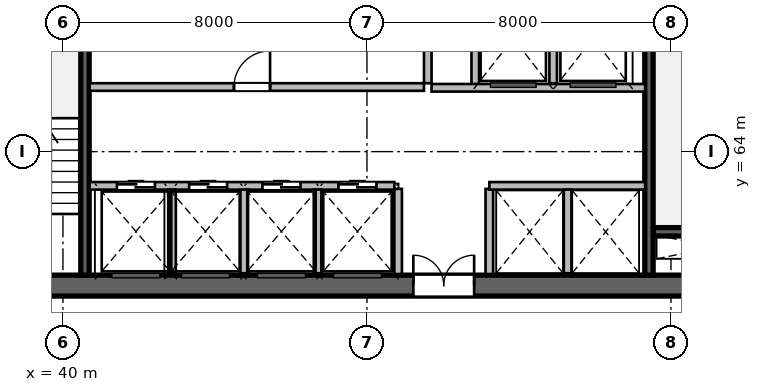
"""IFC4 building model, lengths in metres.
Left out: names, types, materials, properties, quantities, classifications, styles, units other than length and angle.
Written with IfcOpenShell. Run it as: python <this file> out.ifc"""

import sys

from ifc_helpers import new_model, si_unit, direction, frame, frame_2d, origin, place, context, subcontext, project, spatial, rectangle, extrude, source, transform, mapped, element, fill, save


model = new_model("IFC4")
c1 = context("Model", 3, precision=1e-05, world=origin(), true_north=direction((0.0, 1.0)))
c2 = subcontext(c1, "Body", "Model", "MODEL_VIEW")
j1 = project(units=[si_unit("LENGTHUNIT", "METRE"), si_unit("PLANEANGLEUNIT", "RADIAN")], contexts=[c1])
p1 = place(None, origin())
s1 = spatial("IfcSite", under=j1, at=p1, CompositionType="ELEMENT")
p2 = place(p1, origin())
s2 = spatial("IfcBuilding", under=s1, at=p2, CompositionType="ELEMENT")
p3 = place(p2, frame((0.0, 0.0, 82.2)))
s3 = spatial("IfcBuildingStorey", under=s2, at=p3, CompositionType="ELEMENT", Elevation=82.2)
m1 = source(origin(), c2, "Body", "SweptSolid", [
    extrude(rectangle(XDim=21.6, YDim=0.55, at=frame_2d((10.8, 0.0))), origin(), (0.0, 0.0, 1.0), 3.6),
])
p4 = place(p3, frame((37.2, 60.475, 0.0), z_axis=(0.0, 0.0, 1.0), x_axis=(1.0, 0.0, 0.0)))
e1 = element("IfcWall", 1, at=p4, inside=s3, PredefinedType="SHEAR", context=c2, shape_type="MappedRepresentation", body=[
    mapped(m1, transform((0.0, 0.0, 0.0), scale=1.0)),
])
p5 = place(p4, frame((1.1, 0.0, 0.0)))
e2 = element("IfcOpeningElement", 2, at=p5, cuts=e1, PredefinedType="OPENING", context=c2, shape_type="SweptSolid", body=[
    extrude(rectangle(XDim=1.15, YDim=2.15, at=frame_2d((0.575, 1.075))), frame((0.0, 0.285, 0.0), z_axis=(0.0, -1.0, 0.0), x_axis=(1.0, 0.0, 0.0)), (0.0, 0.0, 1.0), 0.57),
])
p6 = place(p4, frame((19.5, 0.0, 0.0)))
e3 = element("IfcOpeningElement", 3, at=p6, cuts=e1, PredefinedType="OPENING", context=c2, shape_type="SweptSolid", body=[
    extrude(rectangle(XDim=0.9, YDim=2.1, at=frame_2d((0.45, 1.05))), frame((0.0, 0.285, 0.0), z_axis=(0.0, -1.0, 0.0), x_axis=(1.0, 0.0, 0.0)), (0.0, 0.0, 1.0), 0.57),
])
p7 = place(p4, frame((12.02, 0.0, 0.0)))
e4 = element("IfcOpeningElement", 4, at=p7, cuts=e1, PredefinedType="OPENING", context=c2, shape_type="SweptSolid", body=[
    extrude(rectangle(XDim=1.6, YDim=2.15, at=frame_2d((0.8, 1.075))), frame((0.0, 0.285, 0.0), z_axis=(0.0, -1.0, 0.0), x_axis=(1.0, 0.0, 0.0)), (0.0, 0.0, 1.0), 0.57),
])
m2 = source(origin(), c2, "Body", "SweptSolid", [
    extrude(rectangle(XDim=3.27, YDim=0.22, at=frame_2d((1.635, 0.0))), origin(), (0.0, 0.0, 1.0), 3.6),
])
p8 = place(p3, frame((55.53, 61.89, 0.0), z_axis=(0.0, 0.0, 1.0), x_axis=(1.0, 0.0, 0.0)))
e5 = element("IfcWall", 5, at=p8, inside=s3, PredefinedType="SHEAR", context=c2, shape_type="MappedRepresentation", body=[
    mapped(m2, transform((0.0, 0.0, 0.0), scale=1.0)),
])
m3 = source(origin(), c2, "Body", "SweptSolid", [
    extrude(rectangle(XDim=10.9, YDim=0.22, at=frame_2d((5.45, 0.0))), origin(), (0.0, 0.0, 1.0), 3.6),
])
p9 = place(p3, frame((40.58, 60.75, 0.0), z_axis=(0.0, 0.0, 1.0), x_axis=(0.0, 1.0, 0.0)))
e6 = element("IfcWall", 6, at=p9, inside=s3, PredefinedType="SHEAR", context=c2, shape_type="MappedRepresentation", body=[
    mapped(m3, transform((0.0, 0.0, 0.0), scale=1.0)),
])
p10 = place(p3, frame((55.42, 60.75, 0.0), z_axis=(0.0, 0.0, 1.0), x_axis=(0.0, 1.0, 0.0)))
e7 = element("IfcWall", 7, at=p10, inside=s3, PredefinedType="SHEAR", context=c2, shape_type="MappedRepresentation", body=[
    mapped(m3, transform((0.0, 0.0, 0.0), scale=1.0)),
])
p11 = place(p10, frame((9.495, 0.0, 0.0)))
e8 = element("IfcOpeningElement", 8, at=p11, cuts=e7, PredefinedType="OPENING", context=c2, shape_type="SweptSolid", body=[
    extrude(rectangle(XDim=1.15, YDim=2.15, at=frame_2d((0.575, 1.075))), frame((0.0, 0.12, 0.0), z_axis=(0.0, -1.0, 0.0), x_axis=(1.0, 0.0, 0.0)), (0.0, 0.0, 1.0), 0.24),
])
m4 = source(origin(), c2, "Body", "SweptSolid", [
    extrude(rectangle(XDim=2.24, YDim=0.2, at=frame_2d((1.12, 0.0))), origin(), (0.0, 0.0, 1.0), 3.28),
])
for number, where, z_axis, x_axis in (
    (9, (48.82, 60.78, 0.0), (0.0, 0.0, 1.0), (0.0, 1.0, 0.0)),
    (10, (51.22, 60.78, 0.0), (0.0, 0.0, 1.0), (0.0, 1.0, 0.0)),
):
    element("IfcWall", number, at=place(p3, frame(where, z_axis=z_axis, x_axis=x_axis)), inside=s3, PredefinedType="SOLIDWALL", context=c2, shape_type="MappedRepresentation", body=[
        mapped(m4, transform((0.0, 0.0, 0.0), scale=1.0)),
    ])
m5 = source(origin(), c2, "Body", "SweptSolid", [
    extrude(rectangle(XDim=5.8, YDim=0.2, at=frame_2d((2.9, 0.0))), origin(), (0.0, 0.0, 1.0), 3.28),
])
p12 = place(p3, frame((49.6, 65.8, 0.0), z_axis=(0.0, 0.0, 1.0), x_axis=(0.0, 1.0, 0.0)))
e11 = element("IfcWall", 11, at=p12, inside=s3, PredefinedType="SOLIDWALL", context=c2, shape_type="MappedRepresentation", body=[
    mapped(m5, transform((0.0, 0.0, 0.0), scale=1.0)),
])
m6 = source(origin(), c2, "Body", "SweptSolid", [
    extrude(rectangle(XDim=2.58, YDim=0.2, at=frame_2d((1.29, 0.0))), origin(), (0.0, 0.0, 1.0), 3.28),
])
p13 = place(p3, frame((50.85, 65.68, 0.0), z_axis=(0.0, 0.0, 1.0), x_axis=(0.0, 1.0, 0.0)))
e12 = element("IfcWall", 12, at=p13, inside=s3, PredefinedType="SOLIDWALL", context=c2, shape_type="MappedRepresentation", body=[
    mapped(m6, transform((0.0, 0.0, 0.0), scale=1.0)),
])
m7 = source(origin(), c2, "Body", "SweptSolid", [
    extrude(rectangle(XDim=2.4, YDim=0.2, at=frame_2d((1.2, 0.0))), origin(), (0.0, 0.0, 1.0), 3.28),
])
p14 = place(p3, frame((52.9, 65.8, 0.0), z_axis=(0.0, 0.0, 1.0), x_axis=(0.0, 1.0, 0.0)))
e13 = element("IfcWall", 13, at=p14, inside=s3, PredefinedType="SOLIDWALL", context=c2, shape_type="MappedRepresentation", body=[
    mapped(m7, transform((0.0, 0.0, 0.0), scale=1.0)),
])
m8 = source(origin(), c2, "Body", "SweptSolid", [
    extrude(rectangle(XDim=5.62, YDim=0.2, at=frame_2d((2.81, 0.0))), origin(), (0.0, 0.0, 1.0), 3.28),
])
p15 = place(p3, frame((49.7, 65.68, 0.0), z_axis=(0.0, 0.0, 1.0), x_axis=(1.0, 0.0, 0.0)))
e14 = element("IfcWall", 14, at=p15, inside=s3, PredefinedType="SOLIDWALL", context=c2, shape_type="MappedRepresentation", body=[
    mapped(m8, transform((0.0, 0.0, 0.0), scale=1.0)),
])
m9 = source(origin(), c2, "Body", "SweptSolid", [
    extrude(rectangle(XDim=8.02, YDim=0.2, at=frame_2d((4.01, 0.0))), origin(), (0.0, 0.0, 1.0), 3.28),
])
p16 = place(p3, frame((40.7, 63.1, 0.0), z_axis=(0.0, 0.0, 1.0), x_axis=(1.0, 0.0, 0.0)))
e15 = element("IfcWall", 15, at=p16, inside=s3, PredefinedType="SOLIDWALL", context=c2, shape_type="MappedRepresentation", body=[
    mapped(m9, transform((0.0, 0.0, 0.0), scale=1.0)),
])
p17 = place(p16, frame((0.72, 0.0, 0.0)))
e16 = element("IfcOpeningElement", 16, at=p17, cuts=e15, PredefinedType="OPENING", context=c2, shape_type="SweptSolid", body=[
    extrude(rectangle(XDim=1.0, YDim=2.15, at=frame_2d((0.5, 1.075))), frame((0.0, 0.11, 0.0), z_axis=(0.0, -1.0, 0.0), x_axis=(1.0, 0.0, 0.0)), (0.0, 0.0, 1.0), 0.22),
])
p18 = place(p16, frame((2.62, 0.0, 0.0)))
e17 = element("IfcOpeningElement", 17, at=p18, cuts=e15, PredefinedType="OPENING", context=c2, shape_type="SweptSolid", body=[
    extrude(rectangle(XDim=1.0, YDim=2.15, at=frame_2d((0.5, 1.075))), frame((0.0, 0.11, 0.0), z_axis=(0.0, -1.0, 0.0), x_axis=(1.0, 0.0, 0.0)), (0.0, 0.0, 1.0), 0.22),
])
p19 = place(p16, frame((4.55, 0.0, 0.0)))
e18 = element("IfcOpeningElement", 18, at=p19, cuts=e15, PredefinedType="OPENING", context=c2, shape_type="SweptSolid", body=[
    extrude(rectangle(XDim=1.0, YDim=2.15, at=frame_2d((0.5, 1.075))), frame((0.0, 0.11, 0.0), z_axis=(0.0, -1.0, 0.0), x_axis=(1.0, 0.0, 0.0)), (0.0, 0.0, 1.0), 0.22),
])
p20 = place(p16, frame((6.55, 0.0, 0.0)))
e19 = element("IfcOpeningElement", 19, at=p20, cuts=e15, PredefinedType="OPENING", context=c2, shape_type="SweptSolid", body=[
    extrude(rectangle(XDim=1.0, YDim=2.15, at=frame_2d((0.5, 1.075))), frame((0.0, 0.11, 0.0), z_axis=(0.0, -1.0, 0.0), x_axis=(1.0, 0.0, 0.0)), (0.0, 0.0, 1.0), 0.22),
])
m10 = source(origin(), c2, "Body", "SweptSolid", [
    extrude(rectangle(XDim=4.1, YDim=0.2, at=frame_2d((2.05, 0.0))), origin(), (0.0, 0.0, 1.0), 3.28),
])
p21 = place(p3, frame((51.22, 63.1, 0.0), z_axis=(0.0, 0.0, 1.0), x_axis=(1.0, 0.0, 0.0)))
e20 = element("IfcWall", 20, at=p21, inside=s3, PredefinedType="SOLIDWALL", context=c2, shape_type="MappedRepresentation", body=[
    mapped(m10, transform((0.0, 0.0, 0.0), scale=1.0)),
])
m11 = source(origin(), c2, "Body", "SweptSolid", [
    extrude(rectangle(XDim=2.2, YDim=0.2, at=frame_2d((1.1, 0.0))), origin(), (0.0, 0.0, 1.0), 3.28),
])
for number, where, z_axis, x_axis in (
    (21, (42.87, 60.8, 0.0), (0.0, 0.0, 1.0), (0.0, 1.0, 0.0)),
    (22, (44.77, 60.8, 0.0), (0.0, 0.0, 1.0), (0.0, 1.0, 0.0)),
    (23, (46.7, 60.8, 0.0), (0.0, 0.0, 1.0), (0.0, 1.0, 0.0)),
    (24, (53.28, 60.8, 0.0), (0.0, 0.0, 1.0), (0.0, 1.0, 0.0)),
):
    element("IfcWall", number, at=place(p3, frame(where, z_axis=z_axis, x_axis=x_axis)), inside=s3, PredefinedType="SOLIDWALL", context=c2, shape_type="MappedRepresentation", body=[
        mapped(m11, transform((0.0, 0.0, 0.0), scale=1.0)),
    ])
m12 = source(origin(), c2, "Body", "SweptSolid", [
    extrude(rectangle(XDim=8.8, YDim=0.2, at=frame_2d((4.4, 0.0))), origin(), (0.0, 0.0, 1.0), 3.28),
])
p22 = place(p3, frame((40.7, 65.7, 0.0), z_axis=(0.0, 0.0, 1.0), x_axis=(1.0, 0.0, 0.0)))
e25 = element("IfcWall", 25, at=p22, inside=s3, PredefinedType="SOLIDWALL", context=c2, shape_type="MappedRepresentation", body=[
    mapped(m12, transform((0.0, 0.0, 0.0), scale=1.0)),
])
p23 = place(p22, frame((3.8, 0.0, 0.0)))
e26 = element("IfcOpeningElement", 26, at=p23, cuts=e25, PredefinedType="OPENING", context=c2, shape_type="SweptSolid", body=[
    extrude(rectangle(XDim=0.95, YDim=2.15, at=frame_2d((0.475, 1.075))), frame((0.0, 0.11, 0.0), z_axis=(0.0, -1.0, 0.0), x_axis=(1.0, 0.0, 0.0)), (0.0, 0.0, 1.0), 0.22),
])
m13 = source(origin(), c2, "Body", "SweptSolid", [
    extrude(rectangle(XDim=1.6, YDim=2.15, at=frame_2d((0.8, 1.075))), frame((0.0, 0.025, 0.0), z_axis=(0.0, -1.0, 0.0), x_axis=(1.0, 0.0, 0.0)), (0.0, 0.0, 1.0), 0.05),
])
p24 = place(p7, origin())
e27 = element("IfcDoor", 27, at=p24, inside=s3, OperationType="DOUBLE_DOOR_SINGLE_SWING", PredefinedType="DOOR", context=c2, shape_type="MappedRepresentation", body=[
    mapped(m13, transform((0.0, 0.0, 0.0), scale=1.0)),
])
fill(e4, e27)
m14 = source(origin(), c2, "Body", "SweptSolid", [
    extrude(rectangle(XDim=1.0, YDim=2.15, at=frame_2d((0.5, 1.075))), frame((0.0, 0.025, 0.0), z_axis=(0.0, -1.0, 0.0), x_axis=(1.0, 0.0, 0.0)), (0.0, 0.0, 1.0), 0.05),
])
p25 = place(p17, origin())
e28 = element("IfcDoor", 28, at=p25, inside=s3, OperationType="DOUBLE_DOOR_SLIDING", PredefinedType="DOOR", context=c2, shape_type="MappedRepresentation", body=[
    mapped(m14, transform((0.0, 0.0, 0.0), scale=1.0)),
])
fill(e16, e28)
p26 = place(p18, origin())
e29 = element("IfcDoor", 29, at=p26, inside=s3, OperationType="DOUBLE_DOOR_SLIDING", PredefinedType="DOOR", context=c2, shape_type="MappedRepresentation", body=[
    mapped(m14, transform((0.0, 0.0, 0.0), scale=1.0)),
])
fill(e17, e29)
p27 = place(p19, origin())
e30 = element("IfcDoor", 30, at=p27, inside=s3, OperationType="DOUBLE_DOOR_SLIDING", PredefinedType="DOOR", context=c2, shape_type="MappedRepresentation", body=[
    mapped(m14, transform((0.0, 0.0, 0.0), scale=1.0)),
])
fill(e18, e30)
p28 = place(p20, origin())
e31 = element("IfcDoor", 31, at=p28, inside=s3, OperationType="DOUBLE_DOOR_SLIDING", PredefinedType="DOOR", context=c2, shape_type="MappedRepresentation", body=[
    mapped(m14, transform((0.0, 0.0, 0.0), scale=1.0)),
])
fill(e19, e31)
m15 = source(origin(), c2, "Body", "SweptSolid", [
    extrude(rectangle(XDim=0.95, YDim=2.15, at=frame_2d((0.475, 1.075))), frame((0.0, 0.025, 0.0), z_axis=(0.0, -1.0, 0.0), x_axis=(1.0, 0.0, 0.0)), (0.0, 0.0, 1.0), 0.05),
])
p29 = place(p23, origin())
e32 = element("IfcDoor", 32, at=p29, inside=s3, OperationType="SINGLE_SWING_RIGHT", PredefinedType="DOOR", context=c2, shape_type="MappedRepresentation", body=[
    mapped(m15, transform((0.0, 0.0, 0.0), scale=1.0)),
])
fill(e26, e32)
save(model, sys.argv[1])
